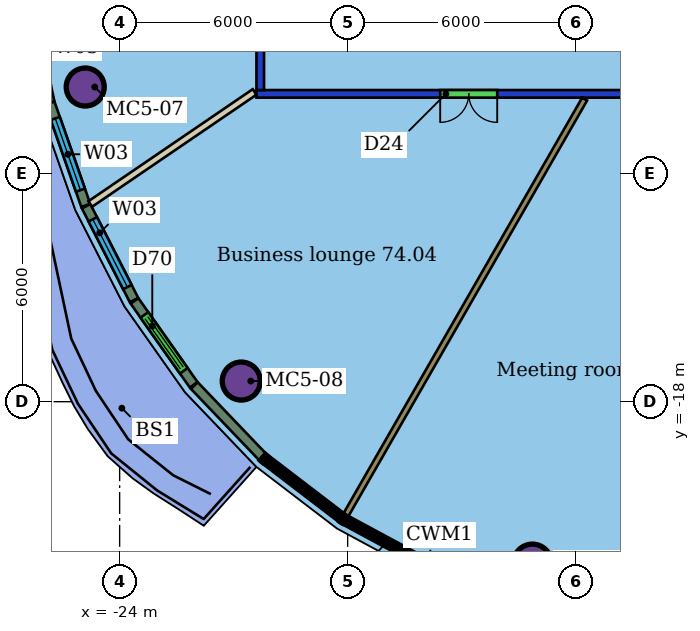
"""IFC4 building model, lengths in metres.
Left out: names, types, materials, properties, quantities, classifications, styles, units other than length and angle.
Written with IfcOpenShell. Run it as: python <this file> out.ifc"""

import sys

from ifc_helpers import new_model, si_unit, direction, frame, frame_2d, origin, origin_2d, place, context, subcontext, project, spatial, rectangle, hollow_circle, extrude, element, fill, save


model = new_model("IFC4")
c1 = context("Model", 3, precision=1e-05, world=origin(), true_north=direction((0.0, 1.0)))
c2 = subcontext(c1, "Body", "Model", "MODEL_VIEW")
j1 = project(units=[si_unit("LENGTHUNIT", "METRE"), si_unit("PLANEANGLEUNIT", "RADIAN")], contexts=[c1])
p1 = place(None, origin())
s1 = spatial("IfcSite", under=j1, at=p1, CompositionType="ELEMENT")
p2 = place(p1, origin())
s2 = spatial("IfcBuilding", under=s1, at=p2, CompositionType="ELEMENT")
p3 = place(p2, frame((0.0, 0.0, 297.3)))
s3 = spatial("IfcBuildingStorey", under=s2, at=p3, CompositionType="ELEMENT", Elevation=297.3)
for number, where, z_axis, x_axis in (
    (1, (-24.906, -9.72, 0.0), (0.0, 0.0, 1.0), (1.0, 0.0, 0.0)),
    (2, (-20.8, -17.457, 0.0), (0.0, 0.0, 1.0), (1.0, 0.0, 0.0)),
    (3, (-13.138, -22.247, 0.0), (0.0, 0.0, 1.0), (1.0, 0.0, 0.0)),
):
    element("IfcColumn", number, at=place(p3, frame(where, z_axis=z_axis, x_axis=x_axis)), inside=s3, PredefinedType="COLUMN", context=c2, shape_type="SweptSolid", body=[
        extrude(hollow_circle(Radius=0.5, WallThickness=0.04, at=origin_2d()), origin(), (0.0, 0.0, 1.0), 3.45),
    ])
p4 = place(p3, frame((8.4, -9.9, 0.0), z_axis=(0.0, 0.0, 1.0), x_axis=(-1.0, 0.0, 0.0)))
e4 = element("IfcWall", 4, at=p4, inside=s3, PredefinedType="PARTITIONING", context=c2, shape_type="SweptSolid", body=[
    extrude(rectangle(XDim=28.8, YDim=0.2, at=frame_2d((14.4, 0.0))), origin(), (0.0, 0.0, 1.0), 3.1),
])
p5 = place(p4, frame((22.465, 0.0, 0.0)))
e5 = element("IfcOpeningElement", 5, at=p5, cuts=e4, PredefinedType="OPENING", context=c2, shape_type="SweptSolid", body=[
    extrude(rectangle(XDim=1.5, YDim=2.1, at=frame_2d((0.75, 1.05))), frame((0.0, 0.11, 0.0), z_axis=(0.0, -1.0, 0.0), x_axis=(1.0, 0.0, 0.0)), (0.0, 0.0, 1.0), 0.22),
])
p6 = place(p4, frame((17.885, 0.0, 0.0)))
e6 = element("IfcOpeningElement", 6, at=p6, cuts=e4, PredefinedType="OPENING", context=c2, shape_type="SweptSolid", body=[
    extrude(rectangle(XDim=0.9, YDim=2.1, at=frame_2d((0.45, 1.05))), frame((0.0, 0.11, 0.0), z_axis=(0.0, -1.0, 0.0), x_axis=(1.0, 0.0, 0.0)), (0.0, 0.0, 1.0), 0.22),
])
p7 = place(p4, frame((9.462, 0.0, 0.0)))
e7 = element("IfcOpeningElement", 7, at=p7, cuts=e4, PredefinedType="OPENING", context=c2, shape_type="SweptSolid", body=[
    extrude(rectangle(XDim=1.5, YDim=2.1, at=frame_2d((0.75, 1.05))), frame((0.0, 0.11, 0.0), z_axis=(0.0, -1.0, 0.0), x_axis=(1.0, 0.0, 0.0)), (0.0, 0.0, 1.0), 0.22),
])
p8 = place(p3, frame((-20.3, -9.8, 0.0), z_axis=(0.0, 0.0, 1.0), x_axis=(0.0, 1.0, 0.0)))
e8 = element("IfcWall", 8, at=p8, inside=s3, PredefinedType="PARTITIONING", context=c2, shape_type="SweptSolid", body=[
    extrude(rectangle(XDim=19.6, YDim=0.2, at=frame_2d((9.8, 0.0))), origin(), (0.0, 0.0, 1.0), 3.1),
])
p9 = place(p8, frame((12.164, 0.0, 0.0)))
e9 = element("IfcOpeningElement", 9, at=p9, cuts=e8, PredefinedType="OPENING", context=c2, shape_type="SweptSolid", body=[
    extrude(rectangle(XDim=1.5, YDim=2.4, at=frame_2d((0.75, 1.2))), frame((0.0, 0.11, 0.0), z_axis=(0.0, -1.0, 0.0), x_axis=(1.0, 0.0, 0.0)), (0.0, 0.0, 1.0), 0.22),
])
p10 = place(p3, frame((-24.772, -12.797, 0.0), z_axis=(0.0, 0.0, 1.0), x_axis=(0.826284596142, 0.563252843914, 0.0)))
e10 = element("IfcWall", 10, at=p10, inside=s3, PredefinedType="PARTITIONING", context=c2, shape_type="SweptSolid", body=[
    extrude(rectangle(XDim=5.232, YDim=0.175, at=frame_2d((2.616, 0.0))), origin(), (0.0, 0.0, 1.0), 3.45),
])
p11 = place(p3, frame((-18.048, -20.982, 0.0), z_axis=(0.0, 0.0, 1.0), x_axis=(0.497960743115, 0.867199572369, 0.0)))
e11 = element("IfcWall", 11, at=p11, inside=s3, PredefinedType="PARTITIONING", context=c2, shape_type="SweptSolid", body=[
    extrude(rectangle(XDim=12.62, YDim=0.15, at=frame_2d((6.31, 0.0))), origin(), (0.0, 0.0, 1.0), 3.45),
])
p12 = place(p3, frame((-26.446, -7.256, 0.0), z_axis=(0.0, 0.0, 1.0), x_axis=(0.206909487165, -0.978360089191, 0.0)))
e12 = element("IfcWall", 12, at=p12, inside=s3, PredefinedType="SOLIDWALL", context=c2, shape_type="SweptSolid", body=[
    extrude(rectangle(XDim=2.929, YDim=0.25, at=frame_2d((1.464, 0.0))), origin(), (0.0, 0.0, 1.0), 3.15),
])
p13 = place(p12, frame((0.464, 0.0, 0.9)))
e13 = element("IfcOpeningElement", 13, at=p13, cuts=e12, PredefinedType="OPENING", context=c2, shape_type="SweptSolid", body=[
    extrude(rectangle(XDim=2.0, YDim=2.1, at=frame_2d((1.0, 1.05))), frame((0.0, 0.135, 0.0), z_axis=(0.0, -1.0, 0.0), x_axis=(1.0, 0.0, 0.0)), (0.0, 0.0, 1.0), 0.27),
])
p14 = place(p3, frame((-25.833, -10.145, 0.0), z_axis=(0.0, 0.0, 1.0), x_axis=(0.330480153195, -0.943812941395, 0.0)))
e14 = element("IfcWall", 14, at=p14, inside=s3, PredefinedType="SOLIDWALL", context=c2, shape_type="SweptSolid", body=[
    extrude(rectangle(XDim=2.85, YDim=0.25, at=frame_2d((1.425, 0.0))), origin(), (0.0, 0.0, 1.0), 3.15),
])
p15 = place(p14, frame((0.425, 0.0, 0.9)))
e15 = element("IfcOpeningElement", 15, at=p15, cuts=e14, PredefinedType="OPENING", context=c2, shape_type="SweptSolid", body=[
    extrude(rectangle(XDim=2.0, YDim=2.1, at=frame_2d((1.0, 1.05))), frame((0.0, 0.135, 0.0), z_axis=(0.0, -1.0, 0.0), x_axis=(1.0, 0.0, 0.0)), (0.0, 0.0, 1.0), 0.27),
])
p16 = place(p3, frame((-24.882, -12.858, 0.0), z_axis=(0.0, 0.0, 1.0), x_axis=(0.454701355294, -0.890643967865, 0.0)))
e16 = element("IfcWall", 16, at=p16, inside=s3, PredefinedType="SOLIDWALL", context=c2, shape_type="SweptSolid", body=[
    extrude(rectangle(XDim=2.772, YDim=0.25, at=frame_2d((1.386, 0.0))), origin(), (0.0, 0.0, 1.0), 3.15),
])
p17 = place(p16, frame((0.386, 0.0, 0.9)))
e17 = element("IfcOpeningElement", 17, at=p17, cuts=e16, PredefinedType="OPENING", context=c2, shape_type="SweptSolid", body=[
    extrude(rectangle(XDim=2.0, YDim=2.1, at=frame_2d((1.0, 1.05))), frame((0.0, 0.135, 0.0), z_axis=(0.0, -1.0, 0.0), x_axis=(1.0, 0.0, 0.0)), (0.0, 0.0, 1.0), 0.27),
])
p18 = place(p3, frame((-23.608, -15.349, 0.0), z_axis=(0.0, 0.0, 1.0), x_axis=(0.576395629651, -0.817170776594, 0.0)))
e18 = element("IfcWall", 18, at=p18, inside=s3, PredefinedType="SOLIDWALL", context=c2, shape_type="SweptSolid", body=[
    extrude(rectangle(XDim=2.7, YDim=0.25, at=frame_2d((1.35, 0.0))), origin(), (0.0, 0.0, 1.0), 3.15),
])
p19 = place(p18, frame((0.45, 0.0, 0.0)))
e19 = element("IfcOpeningElement", 19, at=p19, cuts=e18, PredefinedType="OPENING", context=c2, shape_type="SweptSolid", body=[
    extrude(rectangle(XDim=1.8, YDim=2.4, at=frame_2d((0.9, 1.2))), frame((0.0, 0.135, 0.0), z_axis=(0.0, -1.0, 0.0), x_axis=(1.0, 0.0, 0.0)), (0.0, 0.0, 1.0), 0.27),
])
p20 = place(p3, frame((-22.035, -17.576, 0.0), z_axis=(0.0, 0.0, 1.0), x_axis=(0.691337834589, -0.722531659145, 0.0)))
e20 = element("IfcWall", 20, at=p20, inside=s3, PredefinedType="SOLIDWALL", context=c2, shape_type="SweptSolid", body=[
    extrude(rectangle(XDim=2.598, YDim=0.25, at=frame_2d((1.299, 0.0))), origin(), (0.0, 0.0, 1.0), 3.15),
])
p21 = place(p5, origin())
e21 = element("IfcDoor", 21, at=p21, inside=s3, OperationType="DOUBLE_DOOR_SINGLE_SWING", PredefinedType="DOOR", context=c2, shape_type="SweptSolid", body=[
    extrude(rectangle(XDim=1.5, YDim=2.1, at=frame_2d((0.75, 1.05))), frame((0.0, 0.025, 0.0), z_axis=(0.0, -1.0, 0.0), x_axis=(1.0, 0.0, 0.0)), (0.0, 0.0, 1.0), 0.05),
])
fill(e5, e21)
p22 = place(p15, origin())
e22 = element("IfcWindow", 22, at=p22, inside=s3, PartitioningType="SINGLE_PANEL", PredefinedType="WINDOW", context=c2, shape_type="SweptSolid", body=[
    extrude(rectangle(XDim=2.0, YDim=2.1, at=frame_2d((1.0, 1.05))), frame((0.0, 0.03, 0.0), z_axis=(0.0, -1.0, 0.0), x_axis=(1.0, 0.0, 0.0)), (0.0, 0.0, 1.0), 0.06),
])
fill(e15, e22)
p23 = place(p17, origin())
e23 = element("IfcWindow", 23, at=p23, inside=s3, PartitioningType="SINGLE_PANEL", PredefinedType="WINDOW", context=c2, shape_type="SweptSolid", body=[
    extrude(rectangle(XDim=2.0, YDim=2.1, at=frame_2d((1.0, 1.05))), frame((0.0, 0.03, 0.0), z_axis=(0.0, -1.0, 0.0), x_axis=(1.0, 0.0, 0.0)), (0.0, 0.0, 1.0), 0.06),
])
fill(e17, e23)
p24 = place(p19, origin())
e24 = element("IfcDoor", 24, at=p24, inside=s3, OperationType="DOUBLE_DOOR_SLIDING", PredefinedType="DOOR", context=c2, shape_type="SweptSolid", body=[
    extrude(rectangle(XDim=1.8, YDim=2.4, at=frame_2d((0.9, 1.2))), frame((0.0, 0.025, 0.0), z_axis=(0.0, -1.0, 0.0), x_axis=(1.0, 0.0, 0.0)), (0.0, 0.0, 1.0), 0.05),
])
fill(e19, e24)
save(model, sys.argv[1])
